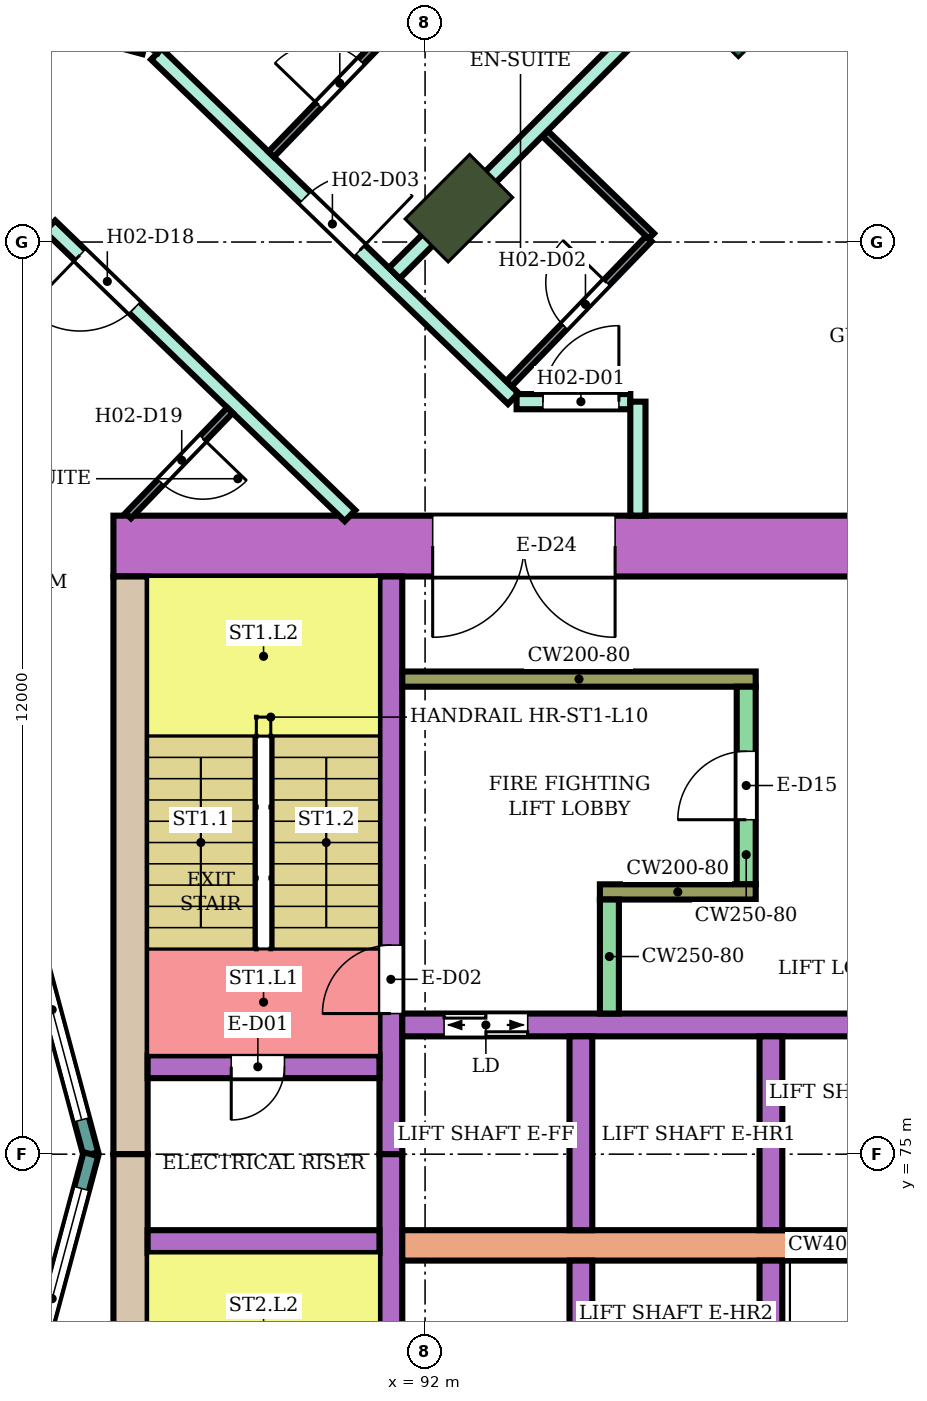
"""IFC4 building model, lengths in metres.
Left out: names, types, materials, properties, quantities, classifications, styles, units other than length and angle.
Written with IfcOpenShell. Run it as: python <this file> out.ifc"""

import sys

from ifc_helpers import new_model, si_unit, direction, frame, frame_2d, origin, origin_2d, place, context, subcontext, project, spatial, rectangle, extrude, element, fill, save


model = new_model("IFC4")
c1 = context("Model", 3, precision=1e-05, world=origin(), true_north=direction((0.0, 1.0)))
c2 = subcontext(c1, "Body", "Model", "MODEL_VIEW")
j1 = project(units=[si_unit("LENGTHUNIT", "METRE"), si_unit("PLANEANGLEUNIT", "RADIAN")], contexts=[c1])
p1 = place(None, origin())
s1 = spatial("IfcSite", under=j1, at=p1, CompositionType="ELEMENT")
p2 = place(p1, origin())
s2 = spatial("IfcBuilding", under=s1, at=p2, CompositionType="ELEMENT")
p3 = place(p2, frame((0.0, 0.0, 47.8)))
s3 = spatial("IfcBuildingStorey", under=s2, at=p3, CompositionType="ELEMENT", Elevation=47.8)
p4 = place(p3, frame((92.445, 87.445, 0.0), z_axis=(0.0, 0.0, 1.0), x_axis=(0.707106781187, 0.707106781187, 0.0)))
e1 = element("IfcColumn", 1, at=p4, inside=s3, PredefinedType="COLUMN", context=c2, shape_type="SweptSolid", body=[
    extrude(rectangle(XDim=1.2, YDim=0.8, at=origin_2d()), origin(), (0.0, 0.0, 1.0), 3.8),
])
p5 = place(p3, frame((95.91, 90.91, 0.0), z_axis=(0.0, 0.0, 1.0), x_axis=(0.707106781187, 0.707106781187, 0.0)))
e2 = element("IfcColumn", 2, at=p5, inside=s3, PredefinedType="COLUMN", context=c2, shape_type="SweptSolid", body=[
    extrude(rectangle(XDim=1.8, YDim=2.4, at=origin_2d()), origin(), (0.0, 0.0, 1.0), 3.8),
])
p6 = place(p3, frame((87.9, 83.0, 0.0), z_axis=(0.0, 0.0, 1.0), x_axis=(1.0, 0.0, 0.0)))
e3 = element("IfcWall", 3, at=p6, inside=s3, PredefinedType="SHEAR", context=c2, shape_type="SweptSolid", body=[
    extrude(rectangle(XDim=14.7, YDim=0.8, at=frame_2d((7.35, 0.0))), origin(), (0.0, 0.0, 1.0), 3.48),
])
p7 = place(p6, frame((4.2, 0.0, 0.0)))
e4 = element("IfcOpeningElement", 4, at=p7, cuts=e3, PredefinedType="OPENING", context=c2, shape_type="SweptSolid", body=[
    extrude(rectangle(XDim=2.4, YDim=2.4, at=frame_2d((1.2, 1.2))), frame((0.0, 0.41, 0.0), z_axis=(0.0, -1.0, 0.0), x_axis=(1.0, 0.0, 0.0)), (0.0, 0.0, 1.0), 0.82),
])
for number, where, z_axis, x_axis in (
    (5, (88.125, 75.0, 0.0), (0.0, 0.0, 1.0), (0.0, 1.0, 0.0)),
    (6, (88.125, 67.4, 0.0), (0.0, 0.0, 1.0), (0.0, 1.0, 0.0)),
):
    element("IfcWall", number, at=place(p3, frame(where, z_axis=z_axis, x_axis=x_axis)), inside=s3, PredefinedType="SHEAR", context=c2, shape_type="SweptSolid", body=[
        extrude(rectangle(XDim=7.6, YDim=0.45, at=frame_2d((3.8, 0.0))), origin(), (0.0, 0.0, 1.0), 3.48),
    ])
p8 = place(p3, frame((91.55, 75.0, 0.0), z_axis=(0.0, 0.0, 1.0), x_axis=(0.0, 1.0, 0.0)))
e7 = element("IfcWall", 7, at=p8, inside=s3, PredefinedType="SHEAR", context=c2, shape_type="SweptSolid", body=[
    extrude(rectangle(XDim=7.6, YDim=0.3, at=frame_2d((3.8, 0.0))), origin(), (0.0, 0.0, 1.0), 3.48),
])
p9 = place(p8, frame((1.85, 0.0, 0.0)))
e8 = element("IfcOpeningElement", 8, at=p9, cuts=e7, PredefinedType="OPENING", context=c2, shape_type="SweptSolid", body=[
    extrude(rectangle(XDim=0.9, YDim=2.1, at=frame_2d((0.45, 1.05))), frame((0.0, 0.16, 0.0), z_axis=(0.0, -1.0, 0.0), x_axis=(1.0, 0.0, 0.0)), (0.0, 0.0, 1.0), 0.32),
])
p10 = place(p3, frame((91.55, 67.4, 0.0), z_axis=(0.0, 0.0, 1.0), x_axis=(0.0, 1.0, 0.0)))
e9 = element("IfcWall", 9, at=p10, inside=s3, PredefinedType="SHEAR", context=c2, shape_type="SweptSolid", body=[
    extrude(rectangle(XDim=7.6, YDim=0.3, at=frame_2d((3.8, 0.0))), origin(), (0.0, 0.0, 1.0), 3.48),
])
p11 = place(p10, frame((0.25, 0.0, 0.0)))
e10 = element("IfcOpeningElement", 10, at=p11, cuts=e9, PredefinedType="OPENING", context=c2, shape_type="SweptSolid", body=[
    extrude(rectangle(XDim=0.9, YDim=2.1, at=frame_2d((0.45, 1.05))), frame((0.0, 0.16, 0.0), z_axis=(0.0, -1.0, 0.0), x_axis=(1.0, 0.0, 0.0)), (0.0, 0.0, 1.0), 0.32),
])
p12 = place(p3, frame((88.35, 76.15, 0.0), z_axis=(0.0, 0.0, 1.0), x_axis=(1.0, 0.0, 0.0)))
e11 = element("IfcWall", 11, at=p12, inside=s3, PredefinedType="SHEAR", context=c2, shape_type="SweptSolid", body=[
    extrude(rectangle(XDim=3.05, YDim=0.3, at=frame_2d((1.525, 0.0))), origin(), (0.0, 0.0, 1.0), 3.48),
])
p13 = place(p12, frame((1.1, 0.0, 0.0)))
e12 = element("IfcOpeningElement", 12, at=p13, cuts=e11, PredefinedType="OPENING", context=c2, shape_type="SweptSolid", body=[
    extrude(rectangle(XDim=0.7, YDim=2.0, at=frame_2d((0.35, 1.0))), frame((0.0, 0.16, 0.0), z_axis=(0.0, -1.0, 0.0), x_axis=(1.0, 0.0, 0.0)), (0.0, 0.0, 1.0), 0.32),
])
p14 = place(p3, frame((88.35, 73.85, 0.0), z_axis=(0.0, 0.0, 1.0), x_axis=(1.0, 0.0, 0.0)))
e13 = element("IfcWall", 13, at=p14, inside=s3, PredefinedType="SHEAR", context=c2, shape_type="SweptSolid", body=[
    extrude(rectangle(XDim=3.05, YDim=0.3, at=frame_2d((1.525, 0.0))), origin(), (0.0, 0.0, 1.0), 3.48),
])
p15 = place(p3, frame((91.7, 76.7, 0.0), z_axis=(0.0, 0.0, 1.0), x_axis=(1.0, 0.0, 0.0)))
e14 = element("IfcWall", 14, at=p15, inside=s3, PredefinedType="SHEAR", context=c2, shape_type="SweptSolid", body=[
    extrude(rectangle(XDim=10.9, YDim=0.3, at=frame_2d((5.45, 0.0))), origin(), (0.0, 0.0, 1.0), 3.48),
])
p16 = place(p15, frame((0.55, 0.0, 0.0)))
e15 = element("IfcOpeningElement", 15, at=p16, cuts=e14, PredefinedType="OPENING", context=c2, shape_type="SweptSolid", body=[
    extrude(rectangle(XDim=1.1, YDim=2.1, at=frame_2d((0.55, 1.05))), frame((0.0, 0.16, 0.0), z_axis=(0.0, -1.0, 0.0), x_axis=(1.0, 0.0, 0.0)), (0.0, 0.0, 1.0), 0.32),
])
p17 = place(p15, frame((8.1, 0.0, 0.0)))
e16 = element("IfcOpeningElement", 16, at=p17, cuts=e14, PredefinedType="OPENING", context=c2, shape_type="SweptSolid", body=[
    extrude(rectangle(XDim=1.0, YDim=2.1, at=frame_2d((0.5, 1.05))), frame((0.0, 0.16, 0.0), z_axis=(0.0, -1.0, 0.0), x_axis=(1.0, 0.0, 0.0)), (0.0, 0.0, 1.0), 0.32),
])
p18 = place(p3, frame((91.7, 73.8, 0.0), z_axis=(0.0, 0.0, 1.0), x_axis=(1.0, 0.0, 0.0)))
e17 = element("IfcWall", 17, at=p18, inside=s3, PredefinedType="SHEAR", context=c2, shape_type="SweptSolid", body=[
    extrude(rectangle(XDim=10.9, YDim=0.4, at=frame_2d((5.45, 0.0))), origin(), (0.0, 0.0, 1.0), 3.48),
])
for number, where, z_axis, x_axis in (
    (18, (94.05, 74.0, 0.0), (0.0, 0.0, 1.0), (0.0, 1.0, 0.0)),
    (19, (96.55, 74.0, 0.0), (0.0, 0.0, 1.0), (0.0, 1.0, 0.0)),
    (20, (94.05, 71.05, 0.0), (0.0, 0.0, 1.0), (0.0, 1.0, 0.0)),
    (21, (96.55, 71.05, 0.0), (0.0, 0.0, 1.0), (0.0, 1.0, 0.0)),
):
    element("IfcWall", number, at=place(p3, frame(where, z_axis=z_axis, x_axis=x_axis)), inside=s3, PredefinedType="SHEAR", context=c2, shape_type="SweptSolid", body=[
        extrude(rectangle(XDim=2.55, YDim=0.3, at=frame_2d((1.275, 0.0))), origin(), (0.0, 0.0, 1.0), 3.48),
    ])
p19 = place(p3, frame((91.7, 81.25, 0.0), z_axis=(0.0, 0.0, 1.0), x_axis=(1.0, 0.0, 0.0)))
e22 = element("IfcWall", 22, at=p19, inside=s3, PredefinedType="SHEAR", context=c2, shape_type="SweptSolid", body=[
    extrude(rectangle(XDim=4.65, YDim=0.2, at=frame_2d((2.325, 0.0))), origin(), (0.0, 0.0, 1.0), 3.48),
])
p20 = place(p3, frame((96.225, 78.55, 0.0), z_axis=(0.0, 0.0, 1.0), x_axis=(0.0, 1.0, 0.0)))
e23 = element("IfcWall", 23, at=p20, inside=s3, PredefinedType="SHEAR", context=c2, shape_type="SweptSolid", body=[
    extrude(rectangle(XDim=2.6, YDim=0.25, at=frame_2d((1.3, 0.0))), origin(), (0.0, 0.0, 1.0), 3.48),
])
p21 = place(p20, frame((0.85, 0.0, 0.0)))
e24 = element("IfcOpeningElement", 24, at=p21, cuts=e23, PredefinedType="OPENING", context=c2, shape_type="SweptSolid", body=[
    extrude(rectangle(XDim=0.9, YDim=2.1, at=frame_2d((0.45, 1.05))), frame((0.0, 0.135, 0.0), z_axis=(0.0, -1.0, 0.0), x_axis=(1.0, 0.0, 0.0)), (0.0, 0.0, 1.0), 0.27),
])
p22 = place(p3, frame((94.3, 78.45, 0.0), z_axis=(0.0, 0.0, 1.0), x_axis=(1.0, 0.0, 0.0)))
e25 = element("IfcWall", 25, at=p22, inside=s3, PredefinedType="SHEAR", context=c2, shape_type="SweptSolid", body=[
    extrude(rectangle(XDim=2.05, YDim=0.2, at=frame_2d((1.025, 0.0))), origin(), (0.0, 0.0, 1.0), 3.48),
])
p23 = place(p3, frame((94.425, 76.85, 0.0), z_axis=(0.0, 0.0, 1.0), x_axis=(0.0, 1.0, 0.0)))
e26 = element("IfcWall", 26, at=p23, inside=s3, PredefinedType="SHEAR", context=c2, shape_type="SweptSolid", body=[
    extrude(rectangle(XDim=1.5, YDim=0.25, at=frame_2d((0.75, 0.0))), origin(), (0.0, 0.0, 1.0), 3.48),
])
p24 = place(p3, frame((87.604, 75.0, 0.0), z_axis=(0.0, 0.0, 1.0), x_axis=(-0.258789828301, 0.965933654434, 0.0)))
e27 = element("IfcWall", 27, at=p24, inside=s3, PredefinedType="NOTDEFINED", context=c2, shape_type="SweptSolid", body=[
    extrude(rectangle(XDim=3.936, YDim=0.2, at=frame_2d((1.968, 0.0))), origin(), (0.0, 0.0, 1.0), 3.8),
])
p25 = place(p24, frame((0.468, 0.0, 0.9)))
e28 = element("IfcOpeningElement", 28, at=p25, cuts=e27, PredefinedType="OPENING", context=c2, shape_type="SweptSolid", body=[
    extrude(rectangle(XDim=3.0, YDim=2.3, at=frame_2d((1.5, 1.15))), frame((0.0, 0.11, 0.0), z_axis=(0.0, -1.0, 0.0), x_axis=(1.0, 0.0, 0.0)), (0.0, 0.0, 1.0), 0.22),
])
p26 = place(p3, frame((86.585, 71.198, 0.0), z_axis=(0.0, 0.0, 1.0), x_axis=(0.258789828301, 0.965933654434, 0.0)))
e29 = element("IfcWall", 29, at=p26, inside=s3, PredefinedType="NOTDEFINED", context=c2, shape_type="SweptSolid", body=[
    extrude(rectangle(XDim=3.936, YDim=0.2, at=frame_2d((1.968, 0.0))), origin(), (0.0, 0.0, 1.0), 3.8),
])
p27 = place(p26, frame((0.468, 0.0, 0.9)))
e30 = element("IfcOpeningElement", 30, at=p27, cuts=e29, PredefinedType="OPENING", context=c2, shape_type="SweptSolid", body=[
    extrude(rectangle(XDim=3.0, YDim=2.3, at=frame_2d((1.5, 1.15))), frame((0.0, 0.11, 0.0), z_axis=(0.0, -1.0, 0.0), x_axis=(1.0, 0.0, 0.0)), (0.0, 0.0, 1.0), 0.22),
])
p28 = place(p3, frame((80.0, 91.796, 0.0), z_axis=(0.0, 0.0, 1.0), x_axis=(0.965896351823, -0.258929020266, 0.0)))
e31 = element("IfcWall", 31, at=p28, inside=s3, PredefinedType="PARTITIONING", context=c2, shape_type="SweptSolid", body=[
    extrude(rectangle(XDim=8.602, YDim=0.2, at=frame_2d((4.301, 0.0))), origin(), (0.0, 0.0, 1.0), 3.35),
])
p29 = place(p28, frame((6.055, 0.0, 0.0)))
e32 = element("IfcOpeningElement", 32, at=p29, cuts=e31, PredefinedType="OPENING", context=c2, shape_type="SweptSolid", body=[
    extrude(rectangle(XDim=0.9, YDim=2.1, at=frame_2d((0.45, 1.05))), frame((0.0, 0.11, 0.0), z_axis=(0.0, -1.0, 0.0), x_axis=(1.0, 0.0, 0.0)), (0.0, 0.0, 1.0), 0.22),
])
p30 = place(p28, frame((2.817, 0.0, 0.0)))
e33 = element("IfcOpeningElement", 33, at=p30, cuts=e31, PredefinedType="OPENING", context=c2, shape_type="SweptSolid", body=[
    extrude(rectangle(XDim=1.0, YDim=2.1, at=frame_2d((0.5, 1.05))), frame((0.0, 0.11, 0.0), z_axis=(0.0, -1.0, 0.0), x_axis=(1.0, 0.0, 0.0)), (0.0, 0.0, 1.0), 0.22),
])
p31 = place(p3, frame((87.064, 87.211, 0.0), z_axis=(0.0, 0.0, 1.0), x_axis=(0.719540958932, -0.694450004262, 0.0)))
e34 = element("IfcWall", 34, at=p31, inside=s3, PredefinedType="PARTITIONING", context=c2, shape_type="SweptSolid", body=[
    extrude(rectangle(XDim=5.488, YDim=0.2, at=frame_2d((2.744, 0.0))), origin(), (0.0, 0.0, 1.0), 3.35),
])
p32 = place(p31, frame((0.55, 0.0, 0.0)))
e35 = element("IfcOpeningElement", 35, at=p32, cuts=e34, PredefinedType="OPENING", context=c2, shape_type="SweptSolid", body=[
    extrude(rectangle(XDim=1.0, YDim=2.1, at=frame_2d((0.5, 1.05))), frame((0.0, 0.11, 0.0), z_axis=(0.0, -1.0, 0.0), x_axis=(1.0, 0.0, 0.0)), (0.0, 0.0, 1.0), 0.22),
])
p33 = place(p3, frame((88.465, 89.473, 0.0), z_axis=(0.0, 0.0, 1.0), x_axis=(0.719474304909, -0.694519059908, 0.0)))
e36 = element("IfcWall", 36, at=p33, inside=s3, PredefinedType="PARTITIONING", context=c2, shape_type="SweptSolid", body=[
    extrude(rectangle(XDim=6.525, YDim=0.2, at=frame_2d((3.263, 0.0))), origin(), (0.0, 0.0, 1.0), 3.35),
])
p34 = place(p33, frame((2.719, 0.0, 0.0)))
e37 = element("IfcOpeningElement", 37, at=p34, cuts=e36, PredefinedType="OPENING", context=c2, shape_type="SweptSolid", body=[
    extrude(rectangle(XDim=1.0, YDim=2.1, at=frame_2d((0.5, 1.05))), frame((0.0, 0.11, 0.0), z_axis=(0.0, -1.0, 0.0), x_axis=(1.0, 0.0, 0.0)), (0.0, 0.0, 1.0), 0.22),
])
p35 = place(p3, frame((88.397, 89.539, 0.0), z_axis=(0.0, 0.0, 1.0), x_axis=(0.500228379329, 0.86589350876, 0.0)))
e38 = element("IfcWall", 38, at=p35, inside=s3, PredefinedType="PARTITIONING", context=c2, shape_type="SweptSolid", body=[
    extrude(rectangle(XDim=9.008, YDim=0.2, at=frame_2d((4.504, 0.0))), origin(), (0.0, 0.0, 1.0), 3.35),
])
p36 = place(p3, frame((91.595, 86.59, 0.0), z_axis=(0.0, 0.0, 1.0), x_axis=(0.707232337591, 0.706981202484, 0.0)))
e39 = element("IfcWall", 39, at=p36, inside=s3, PredefinedType="PARTITIONING", context=c2, shape_type="SweptSolid", body=[
    extrude(rectangle(XDim=6.805, YDim=0.2, at=frame_2d((3.402, 0.0))), origin(), (0.0, 0.0, 1.0), 3.35),
])
p37 = place(p3, frame((93.204, 84.9, 0.0), z_axis=(0.0, 0.0, 1.0), x_axis=(1.0, 0.0, 0.0)))
e40 = element("IfcWall", 40, at=p37, inside=s3, PredefinedType="PARTITIONING", context=c2, shape_type="SweptSolid", body=[
    extrude(rectangle(XDim=1.496, YDim=0.2, at=frame_2d((0.748, 0.0))), origin(), (0.0, 0.0, 1.0), 3.35),
])
p38 = place(p37, frame((0.346, 0.0, 0.0)))
e41 = element("IfcOpeningElement", 41, at=p38, cuts=e40, PredefinedType="OPENING", context=c2, shape_type="SweptSolid", body=[
    extrude(rectangle(XDim=1.0, YDim=2.1, at=frame_2d((0.5, 1.05))), frame((0.0, 0.11, 0.0), z_axis=(0.0, -1.0, 0.0), x_axis=(1.0, 0.0, 0.0)), (0.0, 0.0, 1.0), 0.22),
])
p39 = place(p3, frame((94.8, 83.401, 0.0), z_axis=(0.0, 0.0, 1.0), x_axis=(0.0, 1.0, 0.0)))
e42 = element("IfcWall", 42, at=p39, inside=s3, PredefinedType="PARTITIONING", context=c2, shape_type="SweptSolid", body=[
    extrude(rectangle(XDim=1.499, YDim=0.2, at=frame_2d((0.75, 0.0))), origin(), (0.0, 0.0, 1.0), 3.35),
])
p40 = place(p3, frame((88.095, 83.4, 0.0), z_axis=(0.0, 0.0, 1.0), x_axis=(0.694447472534, 0.719543402368, 0.0)))
e43 = element("IfcWall", 43, at=p40, inside=s3, PredefinedType="PARTITIONING", context=c2, shape_type="SweptSolid", body=[
    extrude(rectangle(XDim=1.926, YDim=0.1, at=frame_2d((0.963, 0.0))), origin(), (0.0, 0.0, 1.0), 3.35),
])
p41 = place(p40, frame((0.613, 0.0, 0.0)))
e44 = element("IfcOpeningElement", 44, at=p41, cuts=e43, PredefinedType="OPENING", context=c2, shape_type="SweptSolid", body=[
    extrude(rectangle(XDim=0.8, YDim=2.1, at=frame_2d((0.4, 1.05))), frame((0.0, 0.06, 0.0), z_axis=(0.0, -1.0, 0.0), x_axis=(1.0, 0.0, 0.0)), (0.0, 0.0, 1.0), 0.12),
])
p42 = place(p3, frame((89.976, 88.154, 0.0), z_axis=(0.0, 0.0, 1.0), x_axis=(0.6945137956, 0.719479386585, 0.0)))
e45 = element("IfcWall", 45, at=p42, inside=s3, PredefinedType="PARTITIONING", context=c2, shape_type="SweptSolid", body=[
    extrude(rectangle(XDim=2.699, YDim=0.1, at=frame_2d((1.35, 0.0))), origin(), (0.0, 0.0, 1.0), 3.35),
])
p43 = place(p42, frame((0.9, 0.0, 0.0)))
e46 = element("IfcOpeningElement", 46, at=p43, cuts=e45, PredefinedType="OPENING", context=c2, shape_type="SweptSolid", body=[
    extrude(rectangle(XDim=0.8, YDim=2.1, at=frame_2d((0.4, 1.05))), frame((0.0, 0.06, 0.0), z_axis=(0.0, -1.0, 0.0), x_axis=(1.0, 0.0, 0.0)), (0.0, 0.0, 1.0), 0.12),
])
p44 = place(p3, frame((93.104, 85.136, 0.0), z_axis=(0.0, 0.0, 1.0), x_axis=(0.694324808789, 0.719661767708, 0.0)))
e47 = element("IfcWall", 47, at=p44, inside=s3, PredefinedType="PARTITIONING", context=c2, shape_type="SweptSolid", body=[
    extrude(rectangle(XDim=2.65, YDim=0.1, at=frame_2d((1.325, 0.0))), origin(), (0.0, 0.0, 1.0), 3.35),
])
p45 = place(p44, frame((1.05, 0.0, 0.0)))
e48 = element("IfcOpeningElement", 48, at=p45, cuts=e47, PredefinedType="OPENING", context=c2, shape_type="SweptSolid", body=[
    extrude(rectangle(XDim=0.8, YDim=2.1, at=frame_2d((0.4, 1.05))), frame((0.0, 0.06, 0.0), z_axis=(0.0, -1.0, 0.0), x_axis=(1.0, 0.0, 0.0)), (0.0, 0.0, 1.0), 0.12),
])
p46 = place(p3, frame((93.582, 88.425, 0.0), z_axis=(0.0, 0.0, 1.0), x_axis=(0.719334224501, -0.694664144361, 0.0)))
e49 = element("IfcWall", 49, at=p46, inside=s3, PredefinedType="PARTITIONING", context=c2, shape_type="SweptSolid", body=[
    extrude(rectangle(XDim=1.94, YDim=0.1, at=frame_2d((0.97, 0.0))), origin(), (0.0, 0.0, 1.0), 3.35),
])
p47 = place(p25, origin())
e50 = element("IfcWindow", 50, at=p47, inside=s3, PartitioningType="SINGLE_PANEL", PredefinedType="WINDOW", context=c2, shape_type="SweptSolid", body=[
    extrude(rectangle(XDim=3.0, YDim=2.3, at=frame_2d((1.5, 1.15))), frame((0.0, 0.03, 0.0), z_axis=(0.0, -1.0, 0.0), x_axis=(1.0, 0.0, 0.0)), (0.0, 0.0, 1.0), 0.06),
])
fill(e28, e50)
p48 = place(p27, origin())
e51 = element("IfcWindow", 51, at=p48, inside=s3, PartitioningType="SINGLE_PANEL", PredefinedType="WINDOW", context=c2, shape_type="SweptSolid", body=[
    extrude(rectangle(XDim=3.0, YDim=2.3, at=frame_2d((1.5, 1.15))), frame((0.0, 0.03, 0.0), z_axis=(0.0, -1.0, 0.0), x_axis=(1.0, 0.0, 0.0)), (0.0, 0.0, 1.0), 0.06),
])
fill(e30, e51)
p49 = place(p38, origin())
e52 = element("IfcDoor", 52, at=p49, inside=s3, OperationType="SINGLE_SWING_RIGHT", PredefinedType="DOOR", context=c2, shape_type="SweptSolid", body=[
    extrude(rectangle(XDim=1.0, YDim=2.1, at=frame_2d((0.5, 1.05))), frame((0.0, 0.025, 0.0), z_axis=(0.0, -1.0, 0.0), x_axis=(1.0, 0.0, 0.0)), (0.0, 0.0, 1.0), 0.05),
])
fill(e41, e52)
p50 = place(p45, origin())
e53 = element("IfcDoor", 53, at=p50, inside=s3, OperationType="SINGLE_SWING_RIGHT", PredefinedType="DOOR", context=c2, shape_type="SweptSolid", body=[
    extrude(rectangle(XDim=0.8, YDim=2.1, at=frame_2d((0.4, 1.05))), frame((0.0, 0.025, 0.0), z_axis=(0.0, -1.0, 0.0), x_axis=(1.0, 0.0, 0.0)), (0.0, 0.0, 1.0), 0.05),
])
fill(e48, e53)
p51 = place(p34, origin())
e54 = element("IfcDoor", 54, at=p51, inside=s3, OperationType="SINGLE_SWING_RIGHT", PredefinedType="DOOR", context=c2, shape_type="SweptSolid", body=[
    extrude(rectangle(XDim=1.0, YDim=2.1, at=frame_2d((0.5, 1.05))), frame((0.0, 0.025, 0.0), z_axis=(0.0, -1.0, 0.0), x_axis=(1.0, 0.0, 0.0)), (0.0, 0.0, 1.0), 0.05),
])
fill(e37, e54)
p52 = place(p43, origin())
e55 = element("IfcDoor", 55, at=p52, inside=s3, OperationType="SINGLE_SWING_LEFT", PredefinedType="DOOR", context=c2, shape_type="SweptSolid", body=[
    extrude(rectangle(XDim=0.8, YDim=2.1, at=frame_2d((0.4, 1.05))), frame((0.0, 0.025, 0.0), z_axis=(0.0, -1.0, 0.0), x_axis=(1.0, 0.0, 0.0)), (0.0, 0.0, 1.0), 0.05),
])
fill(e46, e55)
p53 = place(p32, frame((1.0, 0.0, 0.0), z_axis=(0.0, 0.0, 1.0), x_axis=(-1.0, 0.0, 0.0)))
e56 = element("IfcDoor", 56, at=p53, inside=s3, OperationType="SINGLE_SWING_RIGHT", PredefinedType="DOOR", context=c2, shape_type="SweptSolid", body=[
    extrude(rectangle(XDim=1.0, YDim=2.1, at=frame_2d((0.5, 1.05))), frame((0.0, 0.025, 0.0), z_axis=(0.0, -1.0, 0.0), x_axis=(1.0, 0.0, 0.0)), (0.0, 0.0, 1.0), 0.05),
])
fill(e35, e56)
p54 = place(p41, frame((0.8, 0.0, 0.0), z_axis=(0.0, 0.0, 1.0), x_axis=(-1.0, 0.0, 0.0)))
e57 = element("IfcDoor", 57, at=p54, inside=s3, OperationType="SINGLE_SWING_LEFT", PredefinedType="DOOR", context=c2, shape_type="SweptSolid", body=[
    extrude(rectangle(XDim=0.8, YDim=2.1, at=frame_2d((0.4, 1.05))), frame((0.0, 0.025, 0.0), z_axis=(0.0, -1.0, 0.0), x_axis=(1.0, 0.0, 0.0)), (0.0, 0.0, 1.0), 0.05),
])
fill(e44, e57)
p55 = place(p13, frame((0.7, 0.0, 0.0), z_axis=(0.0, 0.0, 1.0), x_axis=(-1.0, 0.0, 0.0)))
e58 = element("IfcDoor", 58, at=p55, inside=s3, OperationType="SINGLE_SWING_RIGHT", PredefinedType="DOOR", context=c2, shape_type="SweptSolid", body=[
    extrude(rectangle(XDim=0.7, YDim=2.0, at=frame_2d((0.35, 1.0))), frame((0.0, 0.025, 0.0), z_axis=(0.0, -1.0, 0.0), x_axis=(1.0, 0.0, 0.0)), (0.0, 0.0, 1.0), 0.05),
])
fill(e12, e58)
p56 = place(p9, origin())
e59 = element("IfcDoor", 59, at=p56, inside=s3, OperationType="SINGLE_SWING_LEFT", PredefinedType="DOOR", context=c2, shape_type="SweptSolid", body=[
    extrude(rectangle(XDim=0.9, YDim=2.1, at=frame_2d((0.45, 1.05))), frame((0.0, 0.025, 0.0), z_axis=(0.0, -1.0, 0.0), x_axis=(1.0, 0.0, 0.0)), (0.0, 0.0, 1.0), 0.05),
])
fill(e8, e59)
p57 = place(p16, origin())
e60 = element("IfcDoor", 60, at=p57, inside=s3, OperationType="DOUBLE_DOOR_SLIDING", PredefinedType="DOOR", context=c2, shape_type="SweptSolid", body=[
    extrude(rectangle(XDim=1.1, YDim=2.1, at=frame_2d((0.55, 1.05))), frame((0.0, 0.025, 0.0), z_axis=(0.0, -1.0, 0.0), x_axis=(1.0, 0.0, 0.0)), (0.0, 0.0, 1.0), 0.05),
])
fill(e15, e60)
p58 = place(p21, origin())
e61 = element("IfcDoor", 61, at=p58, inside=s3, OperationType="SINGLE_SWING_LEFT", PredefinedType="DOOR", context=c2, shape_type="SweptSolid", body=[
    extrude(rectangle(XDim=0.9, YDim=2.1, at=frame_2d((0.45, 1.05))), frame((0.0, 0.025, 0.0), z_axis=(0.0, -1.0, 0.0), x_axis=(1.0, 0.0, 0.0)), (0.0, 0.0, 1.0), 0.05),
])
fill(e24, e61)
p59 = place(p7, frame((2.4, 0.0, 0.0), z_axis=(0.0, 0.0, 1.0), x_axis=(-1.0, 0.0, 0.0)))
e62 = element("IfcDoor", 62, at=p59, inside=s3, OperationType="DOUBLE_DOOR_SINGLE_SWING", PredefinedType="DOOR", context=c2, shape_type="SweptSolid", body=[
    extrude(rectangle(XDim=2.4, YDim=2.4, at=frame_2d((1.2, 1.2))), frame((0.0, 0.025, 0.0), z_axis=(0.0, -1.0, 0.0), x_axis=(1.0, 0.0, 0.0)), (0.0, 0.0, 1.0), 0.05),
])
fill(e4, e62)
save(model, sys.argv[1])
